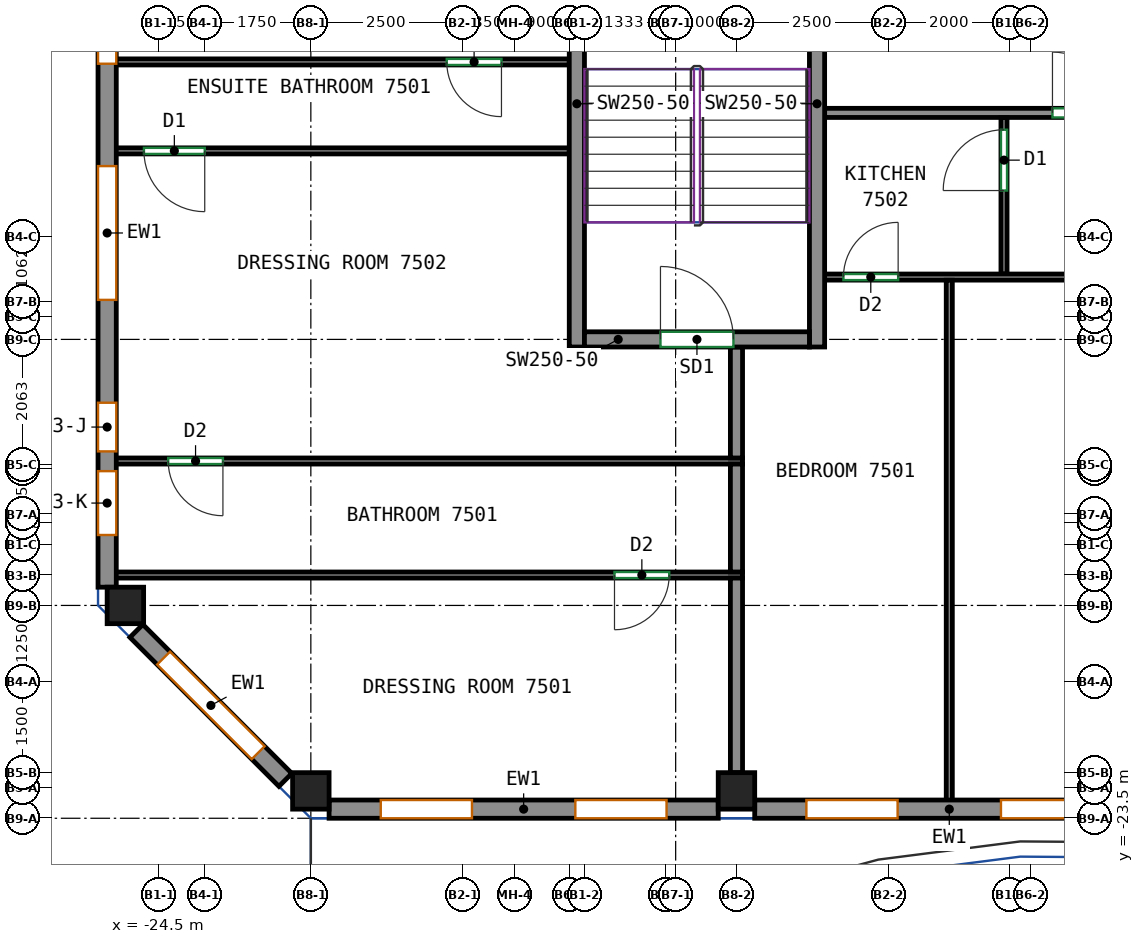
"""IFC4 building model, lengths in metres.
Left out: names, types, materials, properties, quantities, classifications, styles, units other than length and angle.
Written with IfcOpenShell. Run it as: python <this file> out.ifc"""

import sys

from ifc_helpers import new_model, si_unit, direction, frame, frame_2d, origin, origin_2d, place, context, subcontext, project, spatial, rectangle, extrude, source, transform, mapped, element, fill, save


model = new_model("IFC4")
c1 = context("Model", 3, precision=1e-05, world=origin(), true_north=direction((0.0, 1.0)))
c2 = subcontext(c1, "Body", "Model", "MODEL_VIEW")
j1 = project(units=[si_unit("LENGTHUNIT", "METRE"), si_unit("PLANEANGLEUNIT", "RADIAN")], contexts=[c1])
p1 = place(None, origin())
s1 = spatial("IfcSite", under=j1, at=p1, CompositionType="ELEMENT")
p2 = place(p1, origin())
s2 = spatial("IfcBuilding", under=s1, at=p2, CompositionType="ELEMENT")
p3 = place(p2, frame((0.0, 0.0, 301.8)))
s3 = spatial("IfcBuildingStorey", under=s2, at=p3, CompositionType="ELEMENT", Elevation=301.8)
m1 = source(origin(), c2, "Body", "SweptSolid", [
    extrude(rectangle(XDim=0.6, YDim=0.6, at=origin_2d()), origin(), (0.0, 0.0, 1.0), 3.12),
])
for number, where, z_axis, x_axis in (
    (1, (-25.05, -20.0, 0.0), (0.0, 0.0, 1.0), (1.0, 0.0, 0.0)),
    (2, (-22.0, -23.05, 0.0), (0.0, 0.0, 1.0), (1.0, 0.0, 0.0)),
    (3, (-15.0, -23.05, 0.0), (0.0, 0.0, 1.0), (1.0, 0.0, 0.0)),
):
    element("IfcColumn", number, at=place(p3, frame(where, z_axis=z_axis, x_axis=x_axis)), inside=s3, PredefinedType="COLUMN", context=c2, shape_type="MappedRepresentation", body=[
        mapped(m1, transform((0.0, 0.0, 0.0))),
    ])
m2 = source(origin(), c2, "Body", "SweptSolid", [
    extrude(rectangle(XDim=8.0, YDim=0.25, at=frame_2d((4.0, 0.0))), origin(), (0.0, 0.0, 1.0), 3.12),
])
for number, where, z_axis, x_axis in (
    (4, (-17.625, -15.75, 0.0), (0.0, 0.0, 1.0), (0.0, 1.0, 0.0)),
    (5, (-13.675, -15.75, 0.0), (0.0, 0.0, 1.0), (0.0, 1.0, 0.0)),
):
    element("IfcWall", number, at=place(p3, frame(where, z_axis=z_axis, x_axis=x_axis)), inside=s3, PredefinedType="SHEAR", context=c2, shape_type="MappedRepresentation", body=[
        mapped(m2, transform((0.0, 0.0, 0.0))),
    ])
m3 = source(origin(), c2, "Body", "SweptSolid", [
    extrude(rectangle(XDim=3.7, YDim=0.25, at=frame_2d((1.85, 0.0))), origin(), (0.0, 0.0, 1.0), 3.12),
])
p4 = place(p3, frame((-17.5, -15.625, 0.0), z_axis=(0.0, 0.0, 1.0), x_axis=(1.0, 0.0, 0.0)))
e6 = element("IfcWall", 6, at=p4, inside=s3, PredefinedType="SHEAR", context=c2, shape_type="MappedRepresentation", body=[
    mapped(m3, transform((0.0, 0.0, 0.0))),
])
p5 = place(p4, frame((1.25, 0.0, 0.0)))
e7 = element("IfcOpeningElement", 7, at=p5, cuts=e6, PredefinedType="OPENING", context=c2, shape_type="SweptSolid", body=[
    extrude(rectangle(XDim=1.2, YDim=2.1, at=frame_2d((0.6, 1.05))), frame((0.0, 0.135, 0.0), z_axis=(0.0, -1.0, 0.0), x_axis=(1.0, 0.0, 0.0)), (0.0, 0.0, 1.0), 0.27),
])
m4 = source(origin(), c2, "Body", "SweptSolid", [
    extrude(rectangle(XDim=6.4, YDim=0.3, at=frame_2d((3.2, 0.0))), origin(), (0.0, 0.0, 1.0), 3.12),
])
p6 = place(p3, frame((-21.7, -23.35, 0.0), z_axis=(0.0, 0.0, 1.0), x_axis=(1.0, 0.0, 0.0)))
e8 = element("IfcWall", 8, at=p6, inside=s3, PredefinedType="SOLIDWALL", context=c2, shape_type="MappedRepresentation", body=[
    mapped(m4, transform((0.0, 0.0, 0.0))),
])
p7 = place(p6, frame((0.85, 0.0, 0.8)))
e9 = element("IfcOpeningElement", 9, at=p7, cuts=e8, PredefinedType="OPENING", context=c2, shape_type="SweptSolid", body=[
    extrude(rectangle(XDim=1.5, YDim=2.05, at=frame_2d((0.75, 1.025))), frame((0.0, 0.16, 0.0), z_axis=(0.0, -1.0, 0.0), x_axis=(1.0, 0.0, 0.0)), (0.0, 0.0, 1.0), 0.32),
])
p8 = place(p6, frame((4.05, 0.0, 0.8)))
e10 = element("IfcOpeningElement", 10, at=p8, cuts=e8, PredefinedType="OPENING", context=c2, shape_type="SweptSolid", body=[
    extrude(rectangle(XDim=1.5, YDim=2.05, at=frame_2d((0.75, 1.025))), frame((0.0, 0.16, 0.0), z_axis=(0.0, -1.0, 0.0), x_axis=(1.0, 0.0, 0.0)), (0.0, 0.0, 1.0), 0.32),
])
p9 = place(p3, frame((-14.7, -23.35, 0.0), z_axis=(0.0, 0.0, 1.0), x_axis=(1.0, 0.0, 0.0)))
e11 = element("IfcWall", 11, at=p9, inside=s3, PredefinedType="SOLIDWALL", context=c2, shape_type="MappedRepresentation", body=[
    mapped(m4, transform((0.0, 0.0, 0.0))),
])
p10 = place(p9, frame((0.85, 0.0, 0.8)))
e12 = element("IfcOpeningElement", 12, at=p10, cuts=e11, PredefinedType="OPENING", context=c2, shape_type="SweptSolid", body=[
    extrude(rectangle(XDim=1.5, YDim=2.05, at=frame_2d((0.75, 1.025))), frame((0.0, 0.16, 0.0), z_axis=(0.0, -1.0, 0.0), x_axis=(1.0, 0.0, 0.0)), (0.0, 0.0, 1.0), 0.32),
])
p11 = place(p9, frame((4.05, 0.0, 0.8)))
e13 = element("IfcOpeningElement", 13, at=p11, cuts=e11, PredefinedType="OPENING", context=c2, shape_type="SweptSolid", body=[
    extrude(rectangle(XDim=1.5, YDim=2.05, at=frame_2d((0.75, 1.025))), frame((0.0, 0.16, 0.0), z_axis=(0.0, -1.0, 0.0), x_axis=(1.0, 0.0, 0.0)), (0.0, 0.0, 1.0), 0.32),
])
m5 = source(origin(), c2, "Body", "SweptSolid", [
    extrude(rectangle(XDim=11.65, YDim=0.3, at=frame_2d((5.825, 0.0))), origin(), (0.0, 0.0, 1.0), 3.12),
])
p12 = place(p3, frame((-25.35, -8.05, 0.0), z_axis=(0.0, 0.0, 1.0), x_axis=(0.0, -1.0, 0.0)))
e14 = element("IfcWall", 14, at=p12, inside=s3, PredefinedType="SOLIDWALL", context=c2, shape_type="MappedRepresentation", body=[
    mapped(m5, transform((0.0, 0.0, 0.0))),
])
p13 = place(p12, frame((0.842, 0.0, 0.8)))
e15 = element("IfcOpeningElement", 15, at=p13, cuts=e14, PredefinedType="OPENING", context=c2, shape_type="SweptSolid", body=[
    extrude(rectangle(XDim=2.2, YDim=2.05, at=frame_2d((1.1, 1.025))), frame((0.0, 0.16, 0.0), z_axis=(0.0, -1.0, 0.0), x_axis=(1.0, 0.0, 0.0)), (0.0, 0.0, 1.0), 0.32),
])
p14 = place(p12, frame((4.725, 0.0, 0.8)))
e16 = element("IfcOpeningElement", 16, at=p14, cuts=e14, PredefinedType="OPENING", context=c2, shape_type="SweptSolid", body=[
    extrude(rectangle(XDim=2.2, YDim=2.05, at=frame_2d((1.1, 1.025))), frame((0.0, 0.16, 0.0), z_axis=(0.0, -1.0, 0.0), x_axis=(1.0, 0.0, 0.0)), (0.0, 0.0, 1.0), 0.32),
])
p15 = place(p12, frame((8.617, 0.0, 0.8)))
e17 = element("IfcOpeningElement", 17, at=p15, cuts=e14, PredefinedType="OPENING", context=c2, shape_type="SweptSolid", body=[
    extrude(rectangle(XDim=0.8, YDim=2.05, at=frame_2d((0.4, 1.025))), frame((0.0, 0.16, 0.0), z_axis=(0.0, -1.0, 0.0), x_axis=(1.0, 0.0, 0.0)), (0.0, 0.0, 1.0), 0.32),
])
p16 = place(p12, frame((9.742, 0.0, 0.8)))
e18 = element("IfcOpeningElement", 18, at=p16, cuts=e14, PredefinedType="OPENING", context=c2, shape_type="SweptSolid", body=[
    extrude(rectangle(XDim=1.05, YDim=2.05, at=frame_2d((0.525, 1.025))), frame((0.0, 0.16, 0.0), z_axis=(0.0, -1.0, 0.0), x_axis=(1.0, 0.0, 0.0)), (0.0, 0.0, 1.0), 0.32),
])
m6 = source(origin(), c2, "Body", "SweptSolid", [
    extrude(rectangle(XDim=3.465, YDim=0.3, at=frame_2d((1.732, 0.0))), origin(), (0.0, 0.0, 1.0), 3.12),
])
p17 = place(p3, frame((-24.869, -20.419, 0.0), z_axis=(0.0, 0.0, 1.0), x_axis=(0.707106781187, -0.707106781187, 0.0)))
e19 = element("IfcWall", 19, at=p17, inside=s3, PredefinedType="SOLIDWALL", context=c2, shape_type="MappedRepresentation", body=[
    mapped(m6, transform((0.0, 0.0, 0.0))),
])
p18 = place(p17, frame((0.632, 0.0, 0.8)))
e20 = element("IfcOpeningElement", 20, at=p18, cuts=e19, PredefinedType="OPENING", context=c2, shape_type="SweptSolid", body=[
    extrude(rectangle(XDim=2.2, YDim=2.05, at=frame_2d((1.1, 1.025))), frame((0.0, 0.16, 0.0), z_axis=(0.0, -1.0, 0.0), x_axis=(1.0, 0.0, 0.0)), (0.0, 0.0, 1.0), 0.32),
])
p19 = place(p3, frame((-13.55, -11.9, 0.0), z_axis=(0.0, 0.0, 1.0), x_axis=(1.0, 0.0, 0.0)))
e21 = element("IfcWall", 21, at=p19, inside=s3, PredefinedType="PARTITIONING", context=c2, shape_type="SweptSolid", body=[
    extrude(rectangle(XDim=31.3, YDim=0.15, at=frame_2d((15.65, 0.0))), origin(), (0.0, 0.0, 1.0), 3.12),
])
p20 = place(p19, frame((3.747, 0.0, 0.0)))
e22 = element("IfcOpeningElement", 22, at=p20, cuts=e21, PredefinedType="OPENING", context=c2, shape_type="SweptSolid", body=[
    extrude(rectangle(XDim=1.0, YDim=2.1, at=frame_2d((0.5, 1.05))), frame((0.0, 0.085, 0.0), z_axis=(0.0, -1.0, 0.0), x_axis=(1.0, 0.0, 0.0)), (0.0, 0.0, 1.0), 0.17),
])
p21 = place(p19, frame((22.835, 0.0, 0.0)))
e23 = element("IfcOpeningElement", 23, at=p21, cuts=e21, PredefinedType="OPENING", context=c2, shape_type="SweptSolid", body=[
    extrude(rectangle(XDim=1.0, YDim=2.1, at=frame_2d((0.5, 1.05))), frame((0.0, 0.085, 0.0), z_axis=(0.0, -1.0, 0.0), x_axis=(1.0, 0.0, 0.0)), (0.0, 0.0, 1.0), 0.17),
])
p22 = place(p3, frame((-14.9, -19.5, 0.0), z_axis=(0.0, 0.0, 1.0), x_axis=(-1.0, 0.0, 0.0)))
e24 = element("IfcWall", 24, at=p22, inside=s3, PredefinedType="PARTITIONING", context=c2, shape_type="SweptSolid", body=[
    extrude(rectangle(XDim=10.35, YDim=0.1, at=frame_2d((5.175, 0.0))), origin(), (0.0, 0.0, 1.0), 3.12),
])
p23 = place(p22, frame((1.206, 0.0, 0.0)))
e25 = element("IfcOpeningElement", 25, at=p23, cuts=e24, PredefinedType="OPENING", context=c2, shape_type="SweptSolid", body=[
    extrude(rectangle(XDim=0.9, YDim=2.1, at=frame_2d((0.45, 1.05))), frame((0.0, 0.06, 0.0), z_axis=(0.0, -1.0, 0.0), x_axis=(1.0, 0.0, 0.0)), (0.0, 0.0, 1.0), 0.12),
])
p24 = place(p3, frame((-15.0, -22.75, 0.0), z_axis=(0.0, 0.0, 1.0), x_axis=(0.0, 1.0, 0.0)))
e26 = element("IfcWall", 26, at=p24, inside=s3, PredefinedType="PARTITIONING", context=c2, shape_type="SweptSolid", body=[
    extrude(rectangle(XDim=3.2, YDim=0.2, at=frame_2d((1.6, 0.0))), origin(), (0.0, 0.0, 1.0), 3.12),
])
p25 = place(p3, frame((-14.9, -17.625, 0.0), z_axis=(0.0, 0.0, 1.0), x_axis=(-1.0, 0.0, 0.0)))
e27 = element("IfcWall", 27, at=p25, inside=s3, PredefinedType="PARTITIONING", context=c2, shape_type="SweptSolid", body=[
    extrude(rectangle(XDim=10.35, YDim=0.1, at=frame_2d((5.175, 0.0))), origin(), (0.0, 0.0, 1.0), 3.12),
])
p26 = place(p25, frame((8.546, 0.0, 0.0)))
e28 = element("IfcOpeningElement", 28, at=p26, cuts=e27, PredefinedType="OPENING", context=c2, shape_type="SweptSolid", body=[
    extrude(rectangle(XDim=0.9, YDim=2.1, at=frame_2d((0.45, 1.05))), frame((0.0, 0.06, 0.0), z_axis=(0.0, -1.0, 0.0), x_axis=(1.0, 0.0, 0.0)), (0.0, 0.0, 1.0), 0.12),
])
p27 = place(p3, frame((-15.0, -19.45, 0.0), z_axis=(0.0, 0.0, 1.0), x_axis=(0.0, 1.0, 0.0)))
e29 = element("IfcWall", 29, at=p27, inside=s3, PredefinedType="PARTITIONING", context=c2, shape_type="SweptSolid", body=[
    extrude(rectangle(XDim=1.775, YDim=0.2, at=frame_2d((0.887, 0.0))), origin(), (0.0, 0.0, 1.0), 3.12),
])
p28 = place(p3, frame((-17.75, -12.525, 0.0), z_axis=(0.0, 0.0, 1.0), x_axis=(-1.0, 0.0, 0.0)))
e30 = element("IfcWall", 30, at=p28, inside=s3, PredefinedType="PARTITIONING", context=c2, shape_type="SweptSolid", body=[
    extrude(rectangle(XDim=7.5, YDim=0.1, at=frame_2d((3.75, 0.0))), origin(), (0.0, 0.0, 1.0), 3.12),
])
p29 = place(p28, frame((5.995, 0.0, 0.0)))
e31 = element("IfcOpeningElement", 31, at=p29, cuts=e30, PredefinedType="OPENING", context=c2, shape_type="SweptSolid", body=[
    extrude(rectangle(XDim=1.0, YDim=2.1, at=frame_2d((0.5, 1.05))), frame((0.0, 0.06, 0.0), z_axis=(0.0, -1.0, 0.0), x_axis=(1.0, 0.0, 0.0)), (0.0, 0.0, 1.0), 0.12),
])
p30 = place(p3, frame((-15.0, -17.575, 0.0), z_axis=(0.0, 0.0, 1.0), x_axis=(0.0, 1.0, 0.0)))
e32 = element("IfcWall", 32, at=p30, inside=s3, PredefinedType="PARTITIONING", context=c2, shape_type="SweptSolid", body=[
    extrude(rectangle(XDim=1.825, YDim=0.2, at=frame_2d((0.913, 0.0))), origin(), (0.0, 0.0, 1.0), 3.12),
])
p31 = place(p3, frame((-17.75, -11.062, 0.0), z_axis=(0.0, 0.0, 1.0), x_axis=(-1.0, 0.0, 0.0)))
e33 = element("IfcWall", 33, at=p31, inside=s3, PredefinedType="PARTITIONING", context=c2, shape_type="SweptSolid", body=[
    extrude(rectangle(XDim=7.5, YDim=0.1, at=frame_2d((3.75, 0.0))), origin(), (0.0, 0.0, 1.0), 3.12),
])
p32 = place(p31, frame((1.115, 0.0, 0.0)))
e34 = element("IfcOpeningElement", 34, at=p32, cuts=e33, PredefinedType="OPENING", context=c2, shape_type="SweptSolid", body=[
    extrude(rectangle(XDim=0.9, YDim=2.1, at=frame_2d((0.45, 1.05))), frame((0.0, 0.06, 0.0), z_axis=(0.0, -1.0, 0.0), x_axis=(1.0, 0.0, 0.0)), (0.0, 0.0, 1.0), 0.12),
])
p33 = place(p3, frame((-10.6, -14.55, 0.0), z_axis=(0.0, 0.0, 1.0), x_axis=(0.0, 1.0, 0.0)))
e35 = element("IfcWall", 35, at=p33, inside=s3, PredefinedType="PARTITIONING", context=c2, shape_type="SweptSolid", body=[
    extrude(rectangle(XDim=2.573, YDim=0.1, at=frame_2d((1.287, 0.0))), origin(), (0.0, 0.0, 1.0), 3.12),
])
p34 = place(p33, frame((1.373, 0.0, 0.0)))
e36 = element("IfcOpeningElement", 36, at=p34, cuts=e35, PredefinedType="OPENING", context=c2, shape_type="SweptSolid", body=[
    extrude(rectangle(XDim=1.0, YDim=2.1, at=frame_2d((0.5, 1.05))), frame((0.0, 0.06, 0.0), z_axis=(0.0, -1.0, 0.0), x_axis=(1.0, 0.0, 0.0)), (0.0, 0.0, 1.0), 0.12),
])
p35 = place(p3, frame((-13.55, -14.6, 0.0), z_axis=(0.0, 0.0, 1.0), x_axis=(1.0, 0.0, 0.0)))
e37 = element("IfcWall", 37, at=p35, inside=s3, PredefinedType="PARTITIONING", context=c2, shape_type="SweptSolid", body=[
    extrude(rectangle(XDim=31.3, YDim=0.1, at=frame_2d((15.65, 0.0))), origin(), (0.0, 0.0, 1.0), 3.12),
])
p36 = place(p35, frame((0.309, 0.0, 0.0)))
e38 = element("IfcOpeningElement", 38, at=p36, cuts=e37, PredefinedType="OPENING", context=c2, shape_type="SweptSolid", body=[
    extrude(rectangle(XDim=0.9, YDim=2.1, at=frame_2d((0.45, 1.05))), frame((0.0, 0.06, 0.0), z_axis=(0.0, -1.0, 0.0), x_axis=(1.0, 0.0, 0.0)), (0.0, 0.0, 1.0), 0.12),
])
p37 = place(p35, frame((4.103, 0.0, 0.0)))
e39 = element("IfcOpeningElement", 39, at=p37, cuts=e37, PredefinedType="OPENING", context=c2, shape_type="SweptSolid", body=[
    extrude(rectangle(XDim=1.0, YDim=2.1, at=frame_2d((0.5, 1.05))), frame((0.0, 0.06, 0.0), z_axis=(0.0, -1.0, 0.0), x_axis=(1.0, 0.0, 0.0)), (0.0, 0.0, 1.0), 0.12),
])
p38 = place(p35, frame((13.955, 0.0, 0.0)))
e40 = element("IfcOpeningElement", 40, at=p38, cuts=e37, PredefinedType="OPENING", context=c2, shape_type="SweptSolid", body=[
    extrude(rectangle(XDim=0.9, YDim=2.1, at=frame_2d((0.45, 1.05))), frame((0.0, 0.06, 0.0), z_axis=(0.0, -1.0, 0.0), x_axis=(1.0, 0.0, 0.0)), (0.0, 0.0, 1.0), 0.12),
])
p39 = place(p35, frame((17.453, 0.0, 0.0)))
e41 = element("IfcOpeningElement", 41, at=p39, cuts=e37, PredefinedType="OPENING", context=c2, shape_type="SweptSolid", body=[
    extrude(rectangle(XDim=1.0, YDim=2.1, at=frame_2d((0.5, 1.05))), frame((0.0, 0.06, 0.0), z_axis=(0.0, -1.0, 0.0), x_axis=(1.0, 0.0, 0.0)), (0.0, 0.0, 1.0), 0.12),
])
p40 = place(p35, frame((23.13, 0.0, 0.0)))
e42 = element("IfcOpeningElement", 42, at=p40, cuts=e37, PredefinedType="OPENING", context=c2, shape_type="SweptSolid", body=[
    extrude(rectangle(XDim=1.0, YDim=2.1, at=frame_2d((0.5, 1.05))), frame((0.0, 0.06, 0.0), z_axis=(0.0, -1.0, 0.0), x_axis=(1.0, 0.0, 0.0)), (0.0, 0.0, 1.0), 0.12),
])
p41 = place(p3, frame((-11.5, -23.25, 0.0), z_axis=(0.0, 0.0, 1.0), x_axis=(0.0, 1.0, 0.0)))
e43 = element("IfcWall", 43, at=p41, inside=s3, PredefinedType="PARTITIONING", context=c2, shape_type="SweptSolid", body=[
    extrude(rectangle(XDim=8.598, YDim=0.1, at=frame_2d((4.299, 0.0))), origin(), (0.0, 0.0, 1.0), 3.12),
])
p42 = place(p7, origin())
e44 = element("IfcWindow", 44, at=p42, inside=s3, PartitioningType="SINGLE_PANEL", PredefinedType="WINDOW", context=c2, shape_type="SweptSolid", body=[
    extrude(rectangle(XDim=1.5, YDim=2.05, at=frame_2d((0.75, 1.025))), frame((0.0, 0.03, 0.0), z_axis=(0.0, -1.0, 0.0), x_axis=(1.0, 0.0, 0.0)), (0.0, 0.0, 1.0), 0.06),
])
fill(e9, e44)
p43 = place(p8, origin())
e45 = element("IfcWindow", 45, at=p43, inside=s3, PartitioningType="SINGLE_PANEL", PredefinedType="WINDOW", context=c2, shape_type="SweptSolid", body=[
    extrude(rectangle(XDim=1.5, YDim=2.05, at=frame_2d((0.75, 1.025))), frame((0.0, 0.03, 0.0), z_axis=(0.0, -1.0, 0.0), x_axis=(1.0, 0.0, 0.0)), (0.0, 0.0, 1.0), 0.06),
])
fill(e10, e45)
p44 = place(p10, origin())
e46 = element("IfcWindow", 46, at=p44, inside=s3, PartitioningType="SINGLE_PANEL", PredefinedType="WINDOW", context=c2, shape_type="SweptSolid", body=[
    extrude(rectangle(XDim=1.5, YDim=2.05, at=frame_2d((0.75, 1.025))), frame((0.0, 0.03, 0.0), z_axis=(0.0, -1.0, 0.0), x_axis=(1.0, 0.0, 0.0)), (0.0, 0.0, 1.0), 0.06),
])
fill(e12, e46)
p45 = place(p11, origin())
e47 = element("IfcWindow", 47, at=p45, inside=s3, PartitioningType="SINGLE_PANEL", PredefinedType="WINDOW", context=c2, shape_type="SweptSolid", body=[
    extrude(rectangle(XDim=1.5, YDim=2.05, at=frame_2d((0.75, 1.025))), frame((0.0, 0.03, 0.0), z_axis=(0.0, -1.0, 0.0), x_axis=(1.0, 0.0, 0.0)), (0.0, 0.0, 1.0), 0.06),
])
fill(e13, e47)
p46 = place(p13, origin())
e48 = element("IfcWindow", 48, at=p46, inside=s3, PartitioningType="SINGLE_PANEL", PredefinedType="WINDOW", context=c2, shape_type="SweptSolid", body=[
    extrude(rectangle(XDim=2.2, YDim=2.05, at=frame_2d((1.1, 1.025))), frame((0.0, 0.03, 0.0), z_axis=(0.0, -1.0, 0.0), x_axis=(1.0, 0.0, 0.0)), (0.0, 0.0, 1.0), 0.06),
])
fill(e15, e48)
p47 = place(p14, origin())
e49 = element("IfcWindow", 49, at=p47, inside=s3, PartitioningType="SINGLE_PANEL", PredefinedType="WINDOW", context=c2, shape_type="SweptSolid", body=[
    extrude(rectangle(XDim=2.2, YDim=2.05, at=frame_2d((1.1, 1.025))), frame((0.0, 0.03, 0.0), z_axis=(0.0, -1.0, 0.0), x_axis=(1.0, 0.0, 0.0)), (0.0, 0.0, 1.0), 0.06),
])
fill(e16, e49)
p48 = place(p15, origin())
e50 = element("IfcWindow", 50, at=p48, inside=s3, PartitioningType="SINGLE_PANEL", PredefinedType="WINDOW", context=c2, shape_type="SweptSolid", body=[
    extrude(rectangle(XDim=0.8, YDim=2.05, at=frame_2d((0.4, 1.025))), frame((0.0, 0.03, 0.0), z_axis=(0.0, -1.0, 0.0), x_axis=(1.0, 0.0, 0.0)), (0.0, 0.0, 1.0), 0.06),
])
fill(e17, e50)
p49 = place(p18, origin())
e51 = element("IfcWindow", 51, at=p49, inside=s3, PartitioningType="SINGLE_PANEL", PredefinedType="WINDOW", context=c2, shape_type="SweptSolid", body=[
    extrude(rectangle(XDim=2.2, YDim=2.05, at=frame_2d((1.1, 1.025))), frame((0.0, 0.03, 0.0), z_axis=(0.0, -1.0, 0.0), x_axis=(1.0, 0.0, 0.0)), (0.0, 0.0, 1.0), 0.06),
])
fill(e20, e51)
p50 = place(p5, origin())
e52 = element("IfcDoor", 52, at=p50, inside=s3, OperationType="DOUBLE_DOOR_SINGLE_SWING", PredefinedType="DOOR", context=c2, shape_type="SweptSolid", body=[
    extrude(rectangle(XDim=1.2, YDim=2.1, at=frame_2d((0.6, 1.05))), frame((0.0, 0.025, 0.0), z_axis=(0.0, -1.0, 0.0), x_axis=(1.0, 0.0, 0.0)), (0.0, 0.0, 1.0), 0.05),
])
fill(e7, e52)
p51 = place(p23, origin())
e53 = element("IfcDoor", 53, at=p51, inside=s3, OperationType="SINGLE_SWING_RIGHT", PredefinedType="DOOR", context=c2, shape_type="SweptSolid", body=[
    extrude(rectangle(XDim=0.9, YDim=2.1, at=frame_2d((0.45, 1.05))), frame((0.0, 0.025, 0.0), z_axis=(0.0, -1.0, 0.0), x_axis=(1.0, 0.0, 0.0)), (0.0, 0.0, 1.0), 0.05),
])
fill(e25, e53)
p52 = place(p26, origin())
e54 = element("IfcDoor", 54, at=p52, inside=s3, OperationType="SINGLE_SWING_LEFT", PredefinedType="DOOR", context=c2, shape_type="SweptSolid", body=[
    extrude(rectangle(XDim=0.9, YDim=2.1, at=frame_2d((0.45, 1.05))), frame((0.0, 0.025, 0.0), z_axis=(0.0, -1.0, 0.0), x_axis=(1.0, 0.0, 0.0)), (0.0, 0.0, 1.0), 0.05),
])
fill(e28, e54)
p53 = place(p36, origin())
e55 = element("IfcDoor", 55, at=p53, inside=s3, OperationType="SINGLE_SWING_RIGHT", PredefinedType="DOOR", context=c2, shape_type="SweptSolid", body=[
    extrude(rectangle(XDim=0.9, YDim=2.1, at=frame_2d((0.45, 1.05))), frame((0.0, 0.025, 0.0), z_axis=(0.0, -1.0, 0.0), x_axis=(1.0, 0.0, 0.0)), (0.0, 0.0, 1.0), 0.05),
])
fill(e38, e55)
p54 = place(p34, origin())
e56 = element("IfcDoor", 56, at=p54, inside=s3, OperationType="SINGLE_SWING_LEFT", PredefinedType="DOOR", context=c2, shape_type="SweptSolid", body=[
    extrude(rectangle(XDim=1.0, YDim=2.1, at=frame_2d((0.5, 1.05))), frame((0.0, 0.025, 0.0), z_axis=(0.0, -1.0, 0.0), x_axis=(1.0, 0.0, 0.0)), (0.0, 0.0, 1.0), 0.05),
])
fill(e36, e56)
p55 = place(p29, origin())
e57 = element("IfcDoor", 57, at=p55, inside=s3, OperationType="SINGLE_SWING_LEFT", PredefinedType="DOOR", context=c2, shape_type="SweptSolid", body=[
    extrude(rectangle(XDim=1.0, YDim=2.1, at=frame_2d((0.5, 1.05))), frame((0.0, 0.025, 0.0), z_axis=(0.0, -1.0, 0.0), x_axis=(1.0, 0.0, 0.0)), (0.0, 0.0, 1.0), 0.05),
])
fill(e31, e57)
p56 = place(p20, origin())
e58 = element("IfcDoor", 58, at=p56, inside=s3, OperationType="SINGLE_SWING_LEFT", PredefinedType="DOOR", context=c2, shape_type="SweptSolid", body=[
    extrude(rectangle(XDim=1.0, YDim=2.1, at=frame_2d((0.5, 1.05))), frame((0.0, 0.025, 0.0), z_axis=(0.0, -1.0, 0.0), x_axis=(1.0, 0.0, 0.0)), (0.0, 0.0, 1.0), 0.05),
])
fill(e22, e58)
p57 = place(p32, origin())
e59 = element("IfcDoor", 59, at=p57, inside=s3, OperationType="SINGLE_SWING_LEFT", PredefinedType="DOOR", context=c2, shape_type="SweptSolid", body=[
    extrude(rectangle(XDim=0.9, YDim=2.1, at=frame_2d((0.45, 1.05))), frame((0.0, 0.025, 0.0), z_axis=(0.0, -1.0, 0.0), x_axis=(1.0, 0.0, 0.0)), (0.0, 0.0, 1.0), 0.05),
])
fill(e34, e59)
p58 = place(p16, origin())
e60 = element("IfcWindow", 60, at=p58, inside=s3, PartitioningType="SINGLE_PANEL", PredefinedType="WINDOW", context=c2, shape_type="SweptSolid", body=[
    extrude(rectangle(XDim=1.05, YDim=2.05, at=frame_2d((0.525, 1.025))), frame((0.0, 0.03, 0.0), z_axis=(0.0, -1.0, 0.0), x_axis=(1.0, 0.0, 0.0)), (0.0, 0.0, 1.0), 0.06),
])
fill(e18, e60)
save(model, sys.argv[1])
